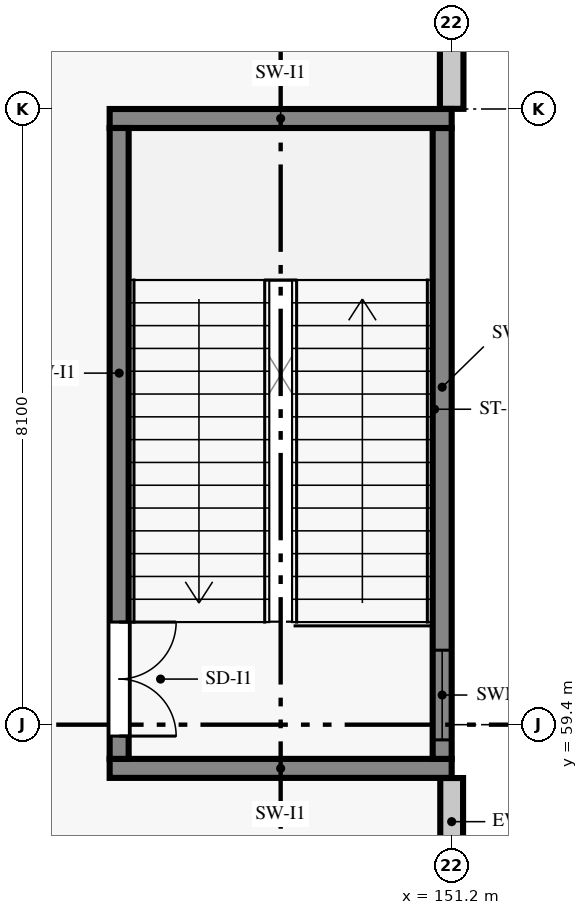
"""IFC4 building model, lengths in metres.
Left out: names, types, materials, properties, quantities, classifications, styles, units other than length and angle.
Written with IfcOpenShell. Run it as: python <this file> out.ifc"""

import sys

from ifc_helpers import new_model, si_unit, direction, frame, frame_2d, origin, place, context, subcontext, project, spatial, rectangle, extrude, element, fill, save


model = new_model("IFC4")
c1 = context("Model", 3, precision=1e-05, world=origin(), true_north=direction((0.0, 1.0)))
c2 = subcontext(c1, "Body", "Model", "MODEL_VIEW")
j1 = project(units=[si_unit("LENGTHUNIT", "METRE"), si_unit("PLANEANGLEUNIT", "RADIAN")], contexts=[c1])
p1 = place(None, origin())
s1 = spatial("IfcSite", under=j1, at=p1, CompositionType="ELEMENT")
p2 = place(p1, origin())
s2 = spatial("IfcBuilding", under=s1, at=p2, CompositionType="ELEMENT")
p3 = place(p2, frame((0.0, 0.0, 4.8)))
s3 = spatial("IfcBuildingStorey", under=s2, at=p3, CompositionType="ELEMENT", Elevation=4.8)
p4 = place(p3, frame((151.2, 54.202, 0.0), z_axis=(0.0, 0.0, 1.0), x_axis=(0.0, 1.0, 0.0)))
e1 = element("IfcWall", 1, at=p4, inside=s3, PredefinedType="STANDARD", context=c2, shape_type="SweptSolid", body=[
    extrude(rectangle(XDim=4.496, YDim=0.3, at=frame_2d((2.248, 0.0))), origin(), (0.0, 0.0, 1.0), 4.56),
])
p5 = place(p4, frame((1.198, 0.0, 0.9)))
e2 = element("IfcOpeningElement", 2, at=p5, cuts=e1, PredefinedType="OPENING", context=c2, shape_type="SweptSolid", body=[
    extrude(rectangle(XDim=2.1, YDim=1.66, at=frame_2d((1.05, 0.83))), frame((0.0, 0.16, 0.0), z_axis=(0.0, -1.0, 0.0), x_axis=(1.0, 0.0, 0.0)), (0.0, 0.0, 1.0), 0.32),
])
p6 = place(p3, frame((151.2, 67.502, 0.0), z_axis=(0.0, 0.0, 1.0), x_axis=(0.0, 1.0, 0.0)))
e3 = element("IfcWall", 3, at=p6, inside=s3, PredefinedType="STANDARD", context=c2, shape_type="SweptSolid", body=[
    extrude(rectangle(XDim=7.778, YDim=0.31, at=frame_2d((3.889, 0.0))), origin(), (0.0, 0.0, 1.0), 4.56),
])
p7 = place(p6, frame((2.739, 0.0, 0.9)))
e4 = element("IfcOpeningElement", 4, at=p7, cuts=e3, PredefinedType="OPENING", context=c2, shape_type="SweptSolid", body=[
    extrude(rectangle(XDim=2.3, YDim=1.66, at=frame_2d((1.15, 0.83))), frame((0.0, 0.165, 0.0), z_axis=(0.0, -1.0, 0.0), x_axis=(1.0, 0.0, 0.0)), (0.0, 0.0, 1.0), 0.33),
])
p8 = place(p3, frame((146.7, 58.825, 0.0), z_axis=(0.0, 0.0, 1.0), x_axis=(1.0, 0.0, 0.0)))
e5 = element("IfcWall", 5, at=p8, inside=s3, PredefinedType="SHEAR", context=c2, shape_type="SweptSolid", body=[
    extrude(rectangle(XDim=4.5, YDim=0.25, at=frame_2d((2.25, 0.0))), origin(), (0.0, 0.0, 1.0), 4.56),
])
p9 = place(p3, frame((151.075, 58.95, 0.0), z_axis=(0.0, 0.0, 1.0), x_axis=(0.0, 1.0, 0.0)))
e6 = element("IfcWall", 6, at=p9, inside=s3, PredefinedType="SHEAR", context=c2, shape_type="SweptSolid", body=[
    extrude(rectangle(XDim=8.3, YDim=0.25, at=frame_2d((4.15, 0.0))), origin(), (0.0, 0.0, 1.0), 4.56),
])
p10 = place(p9, frame((0.25, 0.0, 0.92)))
e7 = element("IfcOpeningElement", 7, at=p10, cuts=e6, PredefinedType="OPENING", context=c2, shape_type="SweptSolid", body=[
    extrude(rectangle(XDim=1.18, YDim=1.48, at=frame_2d((0.59, 0.74))), frame((0.0, 0.135, 0.0), z_axis=(0.0, -1.0, 0.0), x_axis=(1.0, 0.0, 0.0)), (0.0, 0.0, 1.0), 0.27),
])
p11 = place(p3, frame((151.2, 67.375, 0.0), z_axis=(0.0, 0.0, 1.0), x_axis=(-1.0, 0.0, 0.0)))
e8 = element("IfcWall", 8, at=p11, inside=s3, PredefinedType="SHEAR", context=c2, shape_type="SweptSolid", body=[
    extrude(rectangle(XDim=4.5, YDim=0.25, at=frame_2d((2.25, 0.0))), origin(), (0.0, 0.0, 1.0), 4.56),
])
p12 = place(p3, frame((146.825, 67.25, 0.0), z_axis=(0.0, 0.0, 1.0), x_axis=(0.0, -1.0, 0.0)))
e9 = element("IfcWall", 9, at=p12, inside=s3, PredefinedType="SHEAR", context=c2, shape_type="SweptSolid", body=[
    extrude(rectangle(XDim=8.3, YDim=0.25, at=frame_2d((4.15, 0.0))), origin(), (0.0, 0.0, 1.0), 4.56),
])
p13 = place(p12, frame((6.5, 0.0, 0.0)))
e10 = element("IfcOpeningElement", 10, at=p13, cuts=e9, PredefinedType="OPENING", context=c2, shape_type="SweptSolid", body=[
    extrude(rectangle(XDim=1.5, YDim=2.15, at=frame_2d((0.75, 1.075))), frame((0.0, 0.135, 0.0), z_axis=(0.0, -1.0, 0.0), x_axis=(1.0, 0.0, 0.0)), (0.0, 0.0, 1.0), 0.27),
])
p14 = place(p10, origin())
e11 = element("IfcWindow", 11, at=p14, inside=s3, PartitioningType="SINGLE_PANEL", PredefinedType="WINDOW", context=c2, shape_type="SweptSolid", body=[
    extrude(rectangle(XDim=1.18, YDim=1.48, at=frame_2d((0.59, 0.74))), frame((0.0, 0.03, 0.0), z_axis=(0.0, -1.0, 0.0), x_axis=(1.0, 0.0, 0.0)), (0.0, 0.0, 1.0), 0.06),
])
fill(e7, e11)
p15 = place(p13, origin())
e12 = element("IfcDoor", 12, at=p15, inside=s3, OperationType="DOUBLE_DOOR_SINGLE_SWING", PredefinedType="DOOR", context=c2, shape_type="SweptSolid", body=[
    extrude(rectangle(XDim=1.5, YDim=2.15, at=frame_2d((0.75, 1.075))), frame((0.0, 0.025, 0.0), z_axis=(0.0, -1.0, 0.0), x_axis=(1.0, 0.0, 0.0)), (0.0, 0.0, 1.0), 0.05),
])
fill(e10, e12)
save(model, sys.argv[1])
